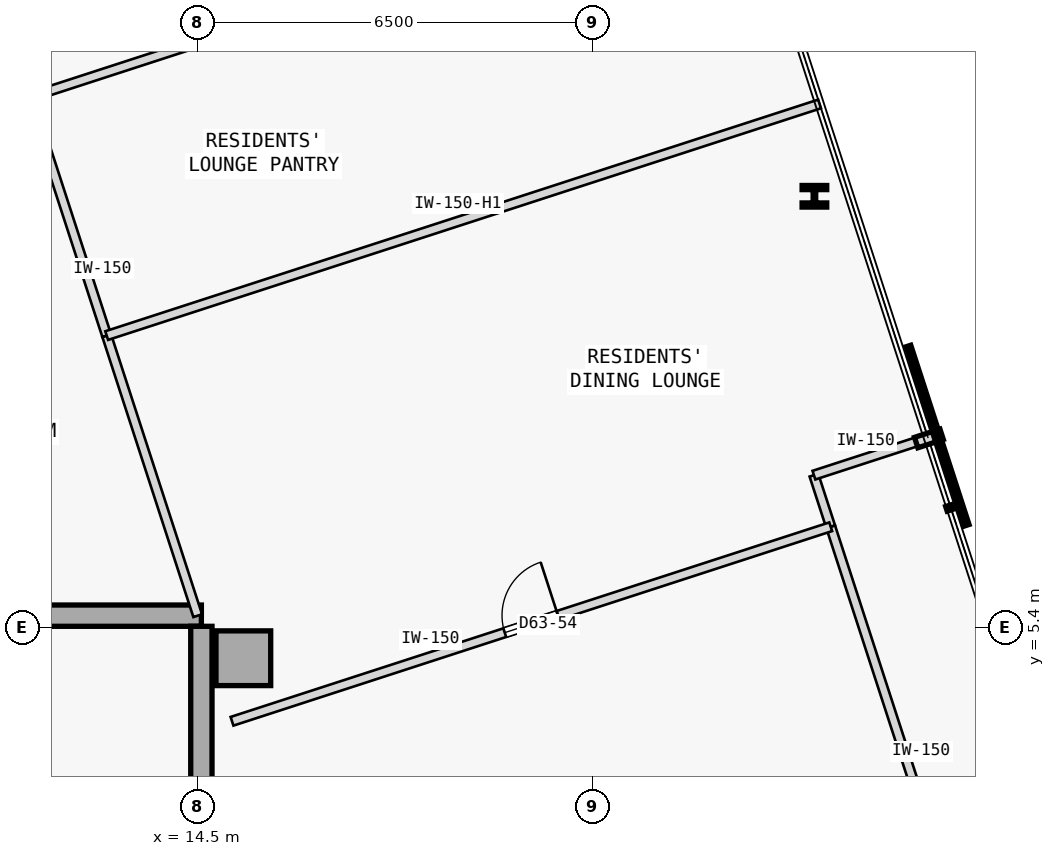
"""IFC4 building model, lengths in metres.
Left out: names, types, materials, properties, quantities, classifications, styles, units other than length and angle.
Written with IfcOpenShell. Run it as: python <this file> out.ifc"""

import sys

from ifc_helpers import new_model, si_unit, direction, frame, frame_2d, origin, origin_2d, place, context, subcontext, project, spatial, rectangle, i_section, extrude, element, fill, save


model = new_model("IFC4")
c1 = context("Model", 3, precision=1e-05, world=origin(), true_north=direction((0.0, 1.0)))
c2 = subcontext(c1, "Body", "Model", "MODEL_VIEW")
j1 = project(units=[si_unit("LENGTHUNIT", "METRE"), si_unit("PLANEANGLEUNIT", "RADIAN")], contexts=[c1])
p1 = place(None, origin())
s1 = spatial("IfcSite", under=j1, at=p1, CompositionType="ELEMENT")
p2 = place(p1, origin())
s2 = spatial("IfcBuilding", under=s1, at=p2, CompositionType="ELEMENT")
p3 = place(p2, frame((0.0, 0.0, 237.7)))
s3 = spatial("IfcBuildingStorey", under=s2, at=p3, CompositionType="ELEMENT", Elevation=237.7)
p4 = place(p3, frame((15.25, 4.9, 0.0), z_axis=(0.0, 0.0, 1.0), x_axis=(1.0, 0.0, 0.0)))
e1 = element("IfcColumn", 1, at=p4, inside=s3, PredefinedType="COLUMN", context=c2, shape_type="SweptSolid", body=[
    extrude(rectangle(XDim=0.9, YDim=0.9, at=origin_2d()), origin(), (0.0, 0.0, 1.0), 3.35),
])
p5 = place(p3, frame((3.15, 5.6, 0.0), z_axis=(0.0, 0.0, 1.0), x_axis=(1.0, 0.0, 0.0)))
e2 = element("IfcWall", 2, at=p5, inside=s3, PredefinedType="SHEAR", context=c2, shape_type="SweptSolid", body=[
    extrude(rectangle(XDim=11.41, YDim=0.35, at=frame_2d((5.705, 0.0))), origin(), (0.0, 0.0, 1.0), 3.125),
])
p6 = place(p3, frame((14.56, -5.425, 0.0), z_axis=(0.0, 0.0, 1.0), x_axis=(0.0, 1.0, 0.0)))
e3 = element("IfcWall", 3, at=p6, inside=s3, PredefinedType="SHEAR", context=c2, shape_type="SweptSolid", body=[
    extrude(rectangle(XDim=10.85, YDim=0.35, at=frame_2d((5.425, 0.0))), origin(), (0.0, 0.0, 1.0), 3.125),
])
p7 = place(p3, frame((24.642, 12.497, 0.0), z_axis=(0.0, 0.0, 1.0), x_axis=(1.0, 0.0, 0.0)))
e4 = element("IfcColumn", 4, at=p7, inside=s3, PredefinedType="COLUMN", context=c2, shape_type="SweptSolid", body=[
    extrude(i_section(OverallWidth=0.405, OverallDepth=0.355, WebThickness=0.042, FlangeThickness=0.068, FilletRadius=0.015, at=origin_2d()), origin(), (0.0, 0.0, 1.0), 3.35),
])
p8 = place(p3, frame((27.637, -1.332, 0.0), z_axis=(0.0, 0.0, 1.0), x_axis=(-0.309040411618, 0.951048907253, 0.0)))
e5 = element("IfcWall", 5, at=p8, inside=s3, PredefinedType="PARTITIONING", context=c2, shape_type="SweptSolid", body=[
    extrude(rectangle(XDim=8.826, YDim=0.15, at=frame_2d((4.413, 0.0))), origin(), (0.0, 0.0, 1.0), 3.125),
])
p9 = place(p3, frame((24.909, 7.062, 0.0), z_axis=(0.0, 0.0, 1.0), x_axis=(-0.30899324298, 0.951064233263, 0.0)))
e6 = element("IfcWall", 6, at=p9, inside=s3, PredefinedType="PARTITIONING", context=c2, shape_type="SweptSolid", body=[
    extrude(rectangle(XDim=0.892, YDim=0.15, at=frame_2d((0.446, 0.0))), origin(), (0.0, 0.0, 1.0), 3.125),
])
p10 = place(p3, frame((24.634, 7.91, 0.0), z_axis=(0.0, 0.0, 1.0), x_axis=(0.951054051148, 0.309024581215, 0.0)))
e7 = element("IfcWall", 7, at=p10, inside=s3, PredefinedType="PARTITIONING", context=c2, shape_type="SweptSolid", body=[
    extrude(rectangle(XDim=1.975, YDim=0.15, at=frame_2d((0.988, 0.0))), origin(), (0.0, 0.0, 1.0), 3.125),
])
p11 = place(p3, frame((11.73, 14.123, 0.0), z_axis=(0.0, 0.0, 1.0), x_axis=(0.951060263663, 0.309005460926, 0.0)))
e8 = element("IfcWall", 8, at=p11, inside=s3, PredefinedType="PARTITIONING", context=c2, shape_type="SweptSolid", body=[
    extrude(rectangle(XDim=12.327, YDim=0.15, at=frame_2d((6.164, 0.0))), origin(), (0.0, 0.0, 1.0), 3.125),
])
p12 = place(p11, frame((5.704, 0.0, 0.0)))
e9 = element("IfcOpeningElement", 9, at=p12, cuts=e8, PredefinedType="OPENING", context=c2, shape_type="SweptSolid", body=[
    extrude(rectangle(XDim=0.92, YDim=2.15, at=frame_2d((0.46, 1.075))), frame((0.0, 0.085, 0.0), z_axis=(0.0, -1.0, 0.0), x_axis=(1.0, 0.0, 0.0)), (0.0, 0.0, 1.0), 0.17),
])
p13 = place(p3, frame((14.5, 5.6, 0.0), z_axis=(0.0, 0.0, 1.0), x_axis=(-0.308974360462, 0.951070367837, 0.0)))
e10 = element("IfcWall", 10, at=p13, inside=s3, PredefinedType="PARTITIONING", context=c2, shape_type="SweptSolid", body=[
    extrude(rectangle(XDim=4.843, YDim=0.15, at=frame_2d((2.421, 0.0))), origin(), (0.0, 0.0, 1.0), 3.125),
])
p14 = place(p3, frame((13.003, 10.206, 0.0), z_axis=(0.0, 0.0, 1.0), x_axis=(-0.309035144366, 0.951050618814, 0.0)))
e11 = element("IfcWall", 11, at=p14, inside=s3, PredefinedType="PARTITIONING", context=c2, shape_type="SweptSolid", body=[
    extrude(rectangle(XDim=4.119, YDim=0.15, at=frame_2d((2.06, 0.0))), origin(), (0.0, 0.0, 1.0), 3.125),
])
p15 = place(p3, frame((15.064, 3.863, 0.0), z_axis=(0.0, 0.0, 1.0), x_axis=(0.951061448945, 0.309001812827, 0.0)))
e12 = element("IfcWall", 12, at=p15, inside=s3, PredefinedType="PARTITIONING", context=c2, shape_type="SweptSolid", body=[
    extrude(rectangle(XDim=10.352, YDim=0.15, at=frame_2d((5.176, 0.0))), origin(), (0.0, 0.0, 1.0), 3.125),
])
p16 = place(p15, frame((4.716, 0.0, 0.0)))
e13 = element("IfcOpeningElement", 13, at=p16, cuts=e12, PredefinedType="OPENING", context=c2, shape_type="SweptSolid", body=[
    extrude(rectangle(XDim=0.92, YDim=2.15, at=frame_2d((0.46, 1.075))), frame((0.0, 0.085, 0.0), z_axis=(0.0, -1.0, 0.0), x_axis=(1.0, 0.0, 0.0)), (0.0, 0.0, 1.0), 0.17),
])
p17 = place(p3, frame((13.003, 10.206, 0.0), z_axis=(0.0, 0.0, 1.0), x_axis=(0.951060263663, 0.309005460926, 0.0)))
e14 = element("IfcWall", 14, at=p17, inside=s3, PredefinedType="PARTITIONING", context=c2, shape_type="SweptSolid", body=[
    extrude(rectangle(XDim=12.327, YDim=0.15, at=frame_2d((6.164, 0.0))), origin(), (0.0, 0.0, 1.0), 2.675),
])
p18 = place(p16, origin())
e15 = element("IfcDoor", 15, at=p18, inside=s3, OperationType="SINGLE_SWING_RIGHT", PredefinedType="DOOR", context=c2, shape_type="SweptSolid", body=[
    extrude(rectangle(XDim=0.92, YDim=2.15, at=frame_2d((0.46, 1.075))), frame((0.0, 0.025, 0.0), z_axis=(0.0, -1.0, 0.0), x_axis=(1.0, 0.0, 0.0)), (0.0, 0.0, 1.0), 0.05),
])
fill(e13, e15)
save(model, sys.argv[1])
